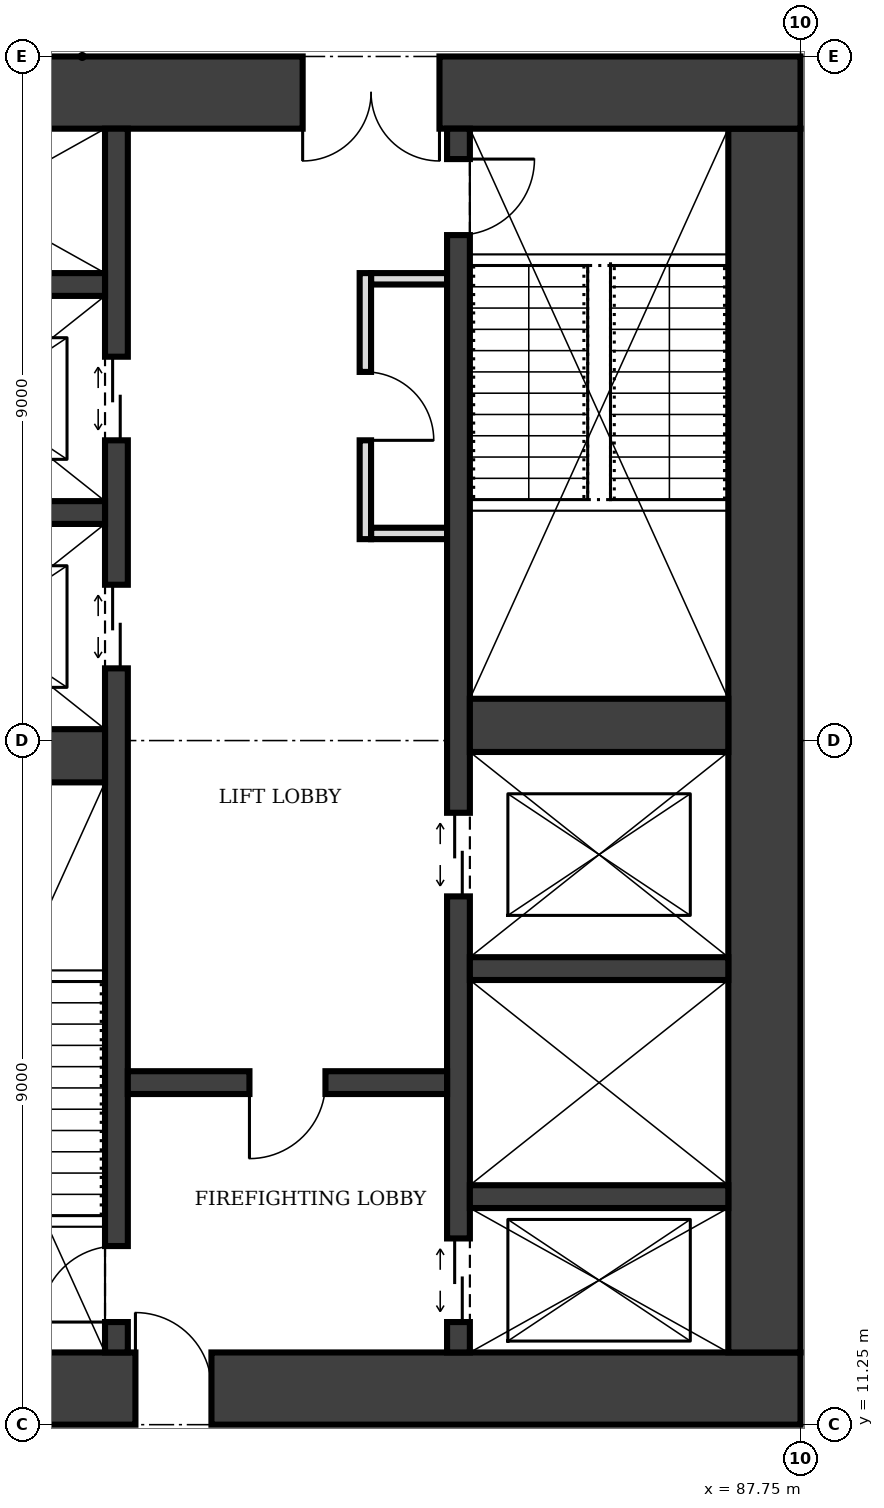
"""IFC4 building model, lengths in metres.
Left out: names, types, materials, properties, quantities, classifications, styles, units other than length and angle.
Written with IfcOpenShell. Run it as: python <this file> out.ifc"""

import sys

from ifc_helpers import new_model, si_unit, direction, frame, frame_2d, origin, place, context, subcontext, project, spatial, rectangle, extrude, element, fill, save


model = new_model("IFC4")
c1 = context("Model", 3, precision=1e-05, world=origin(), true_north=direction((0.0, 1.0)))
c2 = subcontext(c1, "Body", "Model", "MODEL_VIEW")
j1 = project(units=[si_unit("LENGTHUNIT", "METRE"), si_unit("PLANEANGLEUNIT", "RADIAN")], contexts=[c1])
p1 = place(None, origin())
s1 = spatial("IfcSite", under=j1, at=p1, CompositionType="ELEMENT")
p2 = place(p1, origin())
s2 = spatial("IfcBuilding", under=s1, at=p2, CompositionType="ELEMENT")
p3 = place(p2, frame((0.0, 0.0, 89.0)))
s3 = spatial("IfcBuildingStorey", under=s2, at=p3, CompositionType="ELEMENT", Elevation=89.0)
p4 = place(p3, frame((74.25, 11.725, 0.0), z_axis=(0.0, 0.0, 1.0), x_axis=(1.0, 0.0, 0.0)))
e1 = element("IfcWall", 1, at=p4, inside=s3, PredefinedType="SHEAR", context=c2, shape_type="SweptSolid", body=[
    extrude(rectangle(XDim=13.5, YDim=0.95, at=frame_2d((6.75, 0.0))), origin(), (0.0, 0.0, 1.0), 4.0),
])
p5 = place(p4, frame((4.75, 0.0, 0.0)))
e2 = element("IfcOpeningElement", 2, at=p5, cuts=e1, PredefinedType="OPENING", context=c2, shape_type="SweptSolid", body=[
    extrude(rectangle(XDim=1.0, YDim=2.1, at=frame_2d((0.5, 1.05))), frame((0.0, 0.485, 0.0), z_axis=(0.0, -1.0, 0.0), x_axis=(1.0, 0.0, 0.0)), (0.0, 0.0, 1.0), 0.97),
])
p6 = place(p3, frame((87.275, 12.2, 0.0), z_axis=(0.0, 0.0, 1.0), x_axis=(0.0, 1.0, 0.0)))
e3 = element("IfcWall", 3, at=p6, inside=s3, PredefinedType="SHEAR", context=c2, shape_type="SweptSolid", body=[
    extrude(rectangle(XDim=16.1, YDim=0.95, at=frame_2d((8.05, 0.0))), origin(), (0.0, 0.0, 1.0), 4.0),
])
p7 = place(p3, frame((87.75, 28.775, 0.0), z_axis=(0.0, 0.0, 1.0), x_axis=(-1.0, 0.0, 0.0)))
e4 = element("IfcWall", 4, at=p7, inside=s3, PredefinedType="SHEAR", context=c2, shape_type="SweptSolid", body=[
    extrude(rectangle(XDim=13.5, YDim=0.95, at=frame_2d((6.75, 0.0))), origin(), (0.0, 0.0, 1.0), 4.0),
])
p8 = place(p7, frame((4.75, 0.0, 0.0)))
e5 = element("IfcOpeningElement", 5, at=p8, cuts=e4, PredefinedType="OPENING", context=c2, shape_type="SweptSolid", body=[
    extrude(rectangle(XDim=1.8, YDim=2.1, at=frame_2d((0.9, 1.05))), frame((0.0, 0.485, 0.0), z_axis=(0.0, -1.0, 0.0), x_axis=(1.0, 0.0, 0.0)), (0.0, 0.0, 1.0), 0.97),
])
p9 = place(p3, frame((78.75, 12.2, 0.0), z_axis=(0.0, 0.0, 1.0), x_axis=(0.0, 1.0, 0.0)))
e6 = element("IfcWall", 6, at=p9, inside=s3, PredefinedType="SHEAR", context=c2, shape_type="SweptSolid", body=[
    extrude(rectangle(XDim=16.1, YDim=0.3, at=frame_2d((8.05, 0.0))), origin(), (0.0, 0.0, 1.0), 4.0),
])
p10 = place(p9, frame((0.4, 0.0, 0.0)))
e7 = element("IfcOpeningElement", 7, at=p10, cuts=e6, PredefinedType="OPENING", context=c2, shape_type="SweptSolid", body=[
    extrude(rectangle(XDim=1.0, YDim=2.1, at=frame_2d((0.5, 1.05))), frame((0.0, 0.16, 0.0), z_axis=(0.0, -1.0, 0.0), x_axis=(1.0, 0.0, 0.0)), (0.0, 0.0, 1.0), 0.32),
])
p11 = place(p9, frame((9.0, 0.0, 0.0)))
e8 = element("IfcOpeningElement", 8, at=p11, cuts=e6, PredefinedType="OPENING", context=c2, shape_type="SweptSolid", body=[
    extrude(rectangle(XDim=1.1, YDim=2.1, at=frame_2d((0.55, 1.05))), frame((0.0, 0.16, 0.0), z_axis=(0.0, -1.0, 0.0), x_axis=(1.0, 0.0, 0.0)), (0.0, 0.0, 1.0), 0.32),
])
p12 = place(p9, frame((12.0, 0.0, 0.0)))
e9 = element("IfcOpeningElement", 9, at=p12, cuts=e6, PredefinedType="OPENING", context=c2, shape_type="SweptSolid", body=[
    extrude(rectangle(XDim=1.1, YDim=2.1, at=frame_2d((0.55, 1.05))), frame((0.0, 0.16, 0.0), z_axis=(0.0, -1.0, 0.0), x_axis=(1.0, 0.0, 0.0)), (0.0, 0.0, 1.0), 0.32),
])
p13 = place(p3, frame((83.25, 12.2, 0.0), z_axis=(0.0, 0.0, 1.0), x_axis=(0.0, 1.0, 0.0)))
e10 = element("IfcWall", 10, at=p13, inside=s3, PredefinedType="SHEAR", context=c2, shape_type="SweptSolid", body=[
    extrude(rectangle(XDim=16.1, YDim=0.3, at=frame_2d((8.05, 0.0))), origin(), (0.0, 0.0, 1.0), 4.0),
])
p14 = place(p13, frame((14.7, 0.0, 0.0)))
e11 = element("IfcOpeningElement", 11, at=p14, cuts=e10, PredefinedType="OPENING", context=c2, shape_type="SweptSolid", body=[
    extrude(rectangle(XDim=1.0, YDim=2.1, at=frame_2d((0.5, 1.05))), frame((0.0, 0.16, 0.0), z_axis=(0.0, -1.0, 0.0), x_axis=(1.0, 0.0, 0.0)), (0.0, 0.0, 1.0), 0.32),
])
p15 = place(p13, frame((0.4, 0.0, 0.0)))
e12 = element("IfcOpeningElement", 12, at=p15, cuts=e10, PredefinedType="OPENING", context=c2, shape_type="SweptSolid", body=[
    extrude(rectangle(XDim=1.1, YDim=2.1, at=frame_2d((0.55, 1.05))), frame((0.0, 0.16, 0.0), z_axis=(0.0, -1.0, 0.0), x_axis=(1.0, 0.0, 0.0)), (0.0, 0.0, 1.0), 0.32),
])
p16 = place(p13, frame((6.0, 0.0, 0.0)))
e13 = element("IfcOpeningElement", 13, at=p16, cuts=e10, PredefinedType="OPENING", context=c2, shape_type="SweptSolid", body=[
    extrude(rectangle(XDim=1.1, YDim=2.1, at=frame_2d((0.55, 1.05))), frame((0.0, 0.16, 0.0), z_axis=(0.0, -1.0, 0.0), x_axis=(1.0, 0.0, 0.0)), (0.0, 0.0, 1.0), 0.32),
])
p17 = place(p3, frame((75.2, 20.05, 0.0), z_axis=(0.0, 0.0, 1.0), x_axis=(1.0, 0.0, 0.0)))
e14 = element("IfcWall", 14, at=p17, inside=s3, PredefinedType="SHEAR", context=c2, shape_type="SweptSolid", body=[
    extrude(rectangle(XDim=3.4, YDim=0.7, at=frame_2d((1.7, 0.0))), origin(), (0.0, 0.0, 1.0), 4.0),
])
p18 = place(p3, frame((78.9, 15.75, 0.0), z_axis=(0.0, 0.0, 1.0), x_axis=(1.0, 0.0, 0.0)))
e15 = element("IfcWall", 15, at=p18, inside=s3, PredefinedType="SHEAR", context=c2, shape_type="SweptSolid", body=[
    extrude(rectangle(XDim=4.2, YDim=0.3, at=frame_2d((2.1, 0.0))), origin(), (0.0, 0.0, 1.0), 4.0),
])
p19 = place(p18, frame((1.6, 0.0, 0.0)))
e16 = element("IfcOpeningElement", 16, at=p19, cuts=e15, PredefinedType="OPENING", context=c2, shape_type="SweptSolid", body=[
    extrude(rectangle(XDim=1.0, YDim=2.1, at=frame_2d((0.5, 1.05))), frame((0.0, 0.16, 0.0), z_axis=(0.0, -1.0, 0.0), x_axis=(1.0, 0.0, 0.0)), (0.0, 0.0, 1.0), 0.32),
])
for number, where, z_axis, x_axis in (
    (17, (83.4, 14.25, 0.0), (0.0, 0.0, 1.0), (1.0, 0.0, 0.0)),
    (18, (83.4, 17.25, 0.0), (0.0, 0.0, 1.0), (1.0, 0.0, 0.0)),
):
    element("IfcWall", number, at=place(p3, frame(where, z_axis=z_axis, x_axis=x_axis)), inside=s3, PredefinedType="SHEAR", context=c2, shape_type="SweptSolid", body=[
        extrude(rectangle(XDim=3.4, YDim=0.3, at=frame_2d((1.7, 0.0))), origin(), (0.0, 0.0, 1.0), 4.0),
    ])
p20 = place(p3, frame((83.4, 20.45, 0.0), z_axis=(0.0, 0.0, 1.0), x_axis=(1.0, 0.0, 0.0)))
e19 = element("IfcWall", 19, at=p20, inside=s3, PredefinedType="SHEAR", context=c2, shape_type="SweptSolid", body=[
    extrude(rectangle(XDim=3.4, YDim=0.7, at=frame_2d((1.7, 0.0))), origin(), (0.0, 0.0, 1.0), 4.0),
])
for number, where, z_axis, x_axis in (
    (20, (75.2, 23.25, 0.0), (0.0, 0.0, 1.0), (1.0, 0.0, 0.0)),
    (21, (75.2, 26.25, 0.0), (0.0, 0.0, 1.0), (1.0, 0.0, 0.0)),
):
    element("IfcWall", number, at=place(p3, frame(where, z_axis=z_axis, x_axis=x_axis)), inside=s3, PredefinedType="SHEAR", context=c2, shape_type="SweptSolid", body=[
        extrude(rectangle(XDim=3.4, YDim=0.3, at=frame_2d((1.7, 0.0))), origin(), (0.0, 0.0, 1.0), 4.0),
    ])
p21 = place(p3, frame((82.025, 22.9, 0.0), z_axis=(0.0, 0.0, 1.0), x_axis=(0.0, 1.0, 0.0)))
e22 = element("IfcWall", 22, at=p21, inside=s3, PredefinedType="PARTITIONING", context=c2, shape_type="SweptSolid", body=[
    extrude(rectangle(XDim=3.5, YDim=0.15, at=frame_2d((1.75, 0.0))), origin(), (0.0, 0.0, 1.0), 3.75),
])
p22 = place(p21, frame((1.3, 0.0, 0.0)))
e23 = element("IfcOpeningElement", 23, at=p22, cuts=e22, PredefinedType="OPENING", context=c2, shape_type="SweptSolid", body=[
    extrude(rectangle(XDim=0.9, YDim=2.1, at=frame_2d((0.45, 1.05))), frame((0.0, 0.085, 0.0), z_axis=(0.0, -1.0, 0.0), x_axis=(1.0, 0.0, 0.0)), (0.0, 0.0, 1.0), 0.17),
])
for number, where, z_axis, x_axis in (
    (24, (82.1, 22.975, 0.0), (0.0, 0.0, 1.0), (1.0, 0.0, 0.0)),
    (25, (82.1, 26.325, 0.0), (0.0, 0.0, 1.0), (1.0, 0.0, 0.0)),
):
    element("IfcWall", number, at=place(p3, frame(where, z_axis=z_axis, x_axis=x_axis)), inside=s3, PredefinedType="PARTITIONING", context=c2, shape_type="SweptSolid", body=[
        extrude(rectangle(XDim=1.0, YDim=0.15, at=frame_2d((0.5, 0.0))), origin(), (0.0, 0.0, 1.0), 3.75),
    ])
p23 = place(p5, origin())
e26 = element("IfcDoor", 26, at=p23, inside=s3, OperationType="SINGLE_SWING_LEFT", PredefinedType="DOOR", context=c2, shape_type="SweptSolid", body=[
    extrude(rectangle(XDim=1.0, YDim=2.1, at=frame_2d((0.5, 1.05))), frame((0.0, 0.025, 0.0), z_axis=(0.0, -1.0, 0.0), x_axis=(1.0, 0.0, 0.0)), (0.0, 0.0, 1.0), 0.05),
])
fill(e2, e26)
p24 = place(p8, origin())
e27 = element("IfcDoor", 27, at=p24, inside=s3, OperationType="DOUBLE_DOOR_SINGLE_SWING", PredefinedType="DOOR", context=c2, shape_type="SweptSolid", body=[
    extrude(rectangle(XDim=1.8, YDim=2.1, at=frame_2d((0.9, 1.05))), frame((0.0, 0.025, 0.0), z_axis=(0.0, -1.0, 0.0), x_axis=(1.0, 0.0, 0.0)), (0.0, 0.0, 1.0), 0.05),
])
fill(e5, e27)
p25 = place(p19, frame((1.0, 0.0, 0.0), z_axis=(0.0, 0.0, 1.0), x_axis=(-1.0, 0.0, 0.0)))
e28 = element("IfcDoor", 28, at=p25, inside=s3, OperationType="SINGLE_SWING_RIGHT", PredefinedType="DOOR", context=c2, shape_type="SweptSolid", body=[
    extrude(rectangle(XDim=1.0, YDim=2.1, at=frame_2d((0.5, 1.05))), frame((0.0, 0.025, 0.0), z_axis=(0.0, -1.0, 0.0), x_axis=(1.0, 0.0, 0.0)), (0.0, 0.0, 1.0), 0.05),
])
fill(e16, e28)
p26 = place(p10, origin())
e29 = element("IfcDoor", 29, at=p26, inside=s3, OperationType="SINGLE_SWING_LEFT", PredefinedType="DOOR", context=c2, shape_type="SweptSolid", body=[
    extrude(rectangle(XDim=1.0, YDim=2.1, at=frame_2d((0.5, 1.05))), frame((0.0, 0.025, 0.0), z_axis=(0.0, -1.0, 0.0), x_axis=(1.0, 0.0, 0.0)), (0.0, 0.0, 1.0), 0.05),
])
fill(e7, e29)
p27 = place(p14, frame((1.0, 0.0, 0.0), z_axis=(0.0, 0.0, 1.0), x_axis=(-1.0, 0.0, 0.0)))
e30 = element("IfcDoor", 30, at=p27, inside=s3, OperationType="SINGLE_SWING_LEFT", PredefinedType="DOOR", context=c2, shape_type="SweptSolid", body=[
    extrude(rectangle(XDim=1.0, YDim=2.1, at=frame_2d((0.5, 1.05))), frame((0.0, 0.025, 0.0), z_axis=(0.0, -1.0, 0.0), x_axis=(1.0, 0.0, 0.0)), (0.0, 0.0, 1.0), 0.05),
])
fill(e11, e30)
p28 = place(p15, origin())
e31 = element("IfcDoor", 31, at=p28, inside=s3, OperationType="DOUBLE_DOOR_SLIDING", PredefinedType="DOOR", context=c2, shape_type="SweptSolid", body=[
    extrude(rectangle(XDim=1.1, YDim=2.1, at=frame_2d((0.55, 1.05))), frame((0.0, 0.025, 0.0), z_axis=(0.0, -1.0, 0.0), x_axis=(1.0, 0.0, 0.0)), (0.0, 0.0, 1.0), 0.05),
])
fill(e12, e31)
p29 = place(p11, origin())
e32 = element("IfcDoor", 32, at=p29, inside=s3, OperationType="DOUBLE_DOOR_SLIDING", PredefinedType="DOOR", context=c2, shape_type="SweptSolid", body=[
    extrude(rectangle(XDim=1.1, YDim=2.1, at=frame_2d((0.55, 1.05))), frame((0.0, 0.025, 0.0), z_axis=(0.0, -1.0, 0.0), x_axis=(1.0, 0.0, 0.0)), (0.0, 0.0, 1.0), 0.05),
])
fill(e8, e32)
p30 = place(p12, origin())
e33 = element("IfcDoor", 33, at=p30, inside=s3, OperationType="DOUBLE_DOOR_SLIDING", PredefinedType="DOOR", context=c2, shape_type="SweptSolid", body=[
    extrude(rectangle(XDim=1.1, YDim=2.1, at=frame_2d((0.55, 1.05))), frame((0.0, 0.025, 0.0), z_axis=(0.0, -1.0, 0.0), x_axis=(1.0, 0.0, 0.0)), (0.0, 0.0, 1.0), 0.05),
])
fill(e9, e33)
p31 = place(p16, origin())
e34 = element("IfcDoor", 34, at=p31, inside=s3, OperationType="DOUBLE_DOOR_SLIDING", PredefinedType="DOOR", context=c2, shape_type="SweptSolid", body=[
    extrude(rectangle(XDim=1.1, YDim=2.1, at=frame_2d((0.55, 1.05))), frame((0.0, 0.025, 0.0), z_axis=(0.0, -1.0, 0.0), x_axis=(1.0, 0.0, 0.0)), (0.0, 0.0, 1.0), 0.05),
])
fill(e13, e34)
p32 = place(p22, frame((0.9, 0.0, 0.0), z_axis=(0.0, 0.0, 1.0), x_axis=(-1.0, 0.0, 0.0)))
e35 = element("IfcDoor", 35, at=p32, inside=s3, OperationType="SINGLE_SWING_RIGHT", PredefinedType="DOOR", context=c2, shape_type="SweptSolid", body=[
    extrude(rectangle(XDim=0.9, YDim=2.1, at=frame_2d((0.45, 1.05))), frame((0.0, 0.025, 0.0), z_axis=(0.0, -1.0, 0.0), x_axis=(1.0, 0.0, 0.0)), (0.0, 0.0, 1.0), 0.05),
])
fill(e23, e35)
save(model, sys.argv[1])
